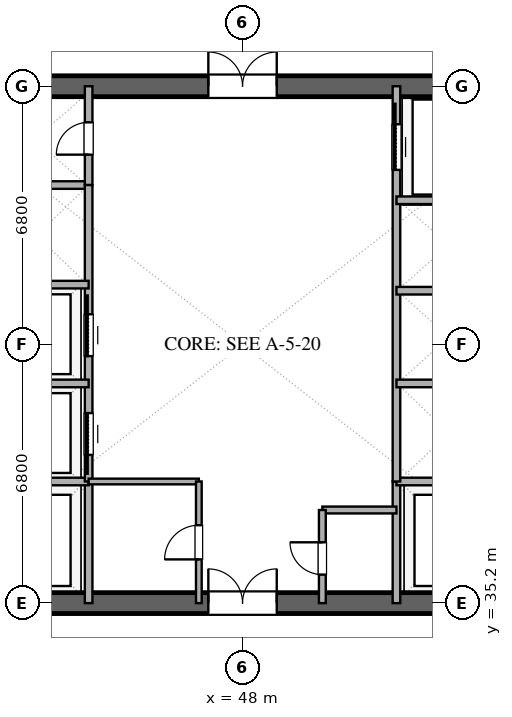
"""IFC4 building model, lengths in metres.
Left out: names, types, materials, properties, quantities, classifications, styles, units other than length and angle.
Written with IfcOpenShell. Run it as: python <this file> out.ifc"""

import sys

from ifc_helpers import new_model, si_unit, direction, frame, frame_2d, origin, place, context, subcontext, project, spatial, rectangle, extrude, element, fill, save


model = new_model("IFC4")
c1 = context("Model", 3, precision=1e-05, world=origin(), true_north=direction((0.0, 1.0)))
c2 = subcontext(c1, "Body", "Model", "MODEL_VIEW")
j1 = project(units=[si_unit("LENGTHUNIT", "METRE"), si_unit("PLANEANGLEUNIT", "RADIAN")], contexts=[c1])
p1 = place(None, origin())
s1 = spatial("IfcSite", under=j1, at=p1, CompositionType="ELEMENT")
p2 = place(p1, origin())
s2 = spatial("IfcBuilding", under=s1, at=p2, CompositionType="ELEMENT")
p3 = place(p2, frame((0.0, 0.0, 120.0)))
s3 = spatial("IfcBuildingStorey", under=s2, at=p3, CompositionType="ELEMENT", Elevation=120.0)
p4 = place(p3, frame((41.0, 35.2, 0.0), z_axis=(0.0, 0.0, 1.0), x_axis=(1.0, 0.0, 0.0)))
e1 = element("IfcWall", 1, at=p4, inside=s3, PredefinedType="SHEAR", context=c2, shape_type="SweptSolid", body=[
    extrude(rectangle(XDim=14.0, YDim=0.55, at=frame_2d((7.0, 0.0))), origin(), (0.0, 0.0, 1.0), 3.38),
])
p5 = place(p4, frame((6.1, 0.0, 0.0)))
e2 = element("IfcOpeningElement", 2, at=p5, cuts=e1, PredefinedType="OPENING", context=c2, shape_type="SweptSolid", body=[
    extrude(rectangle(XDim=1.8, YDim=2.25, at=frame_2d((0.9, 1.125))), frame((0.0, 0.285, 0.0), z_axis=(0.0, -1.0, 0.0), x_axis=(1.0, 0.0, 0.0)), (0.0, 0.0, 1.0), 0.57),
])
p6 = place(p3, frame((41.0, 48.8, 0.0), z_axis=(0.0, 0.0, 1.0), x_axis=(1.0, 0.0, 0.0)))
e3 = element("IfcWall", 3, at=p6, inside=s3, PredefinedType="SHEAR", context=c2, shape_type="SweptSolid", body=[
    extrude(rectangle(XDim=14.0, YDim=0.55, at=frame_2d((7.0, 0.0))), origin(), (0.0, 0.0, 1.0), 3.38),
])
p7 = place(p6, frame((6.1, 0.0, 0.0)))
e4 = element("IfcOpeningElement", 4, at=p7, cuts=e3, PredefinedType="OPENING", context=c2, shape_type="SweptSolid", body=[
    extrude(rectangle(XDim=1.8, YDim=2.25, at=frame_2d((0.9, 1.125))), frame((0.0, 0.285, 0.0), z_axis=(0.0, -1.0, 0.0), x_axis=(1.0, 0.0, 0.0)), (0.0, 0.0, 1.0), 0.57),
])
p8 = place(p3, frame((43.95, 35.2, 0.0), z_axis=(0.0, 0.0, 1.0), x_axis=(0.0, 1.0, 0.0)))
e5 = element("IfcWall", 5, at=p8, inside=s3, PredefinedType="SOLIDWALL", context=c2, shape_type="SweptSolid", body=[
    extrude(rectangle(XDim=3.2, YDim=0.2, at=frame_2d((1.6, 0.0))), origin(), (0.0, 0.0, 1.0), 2.74),
])
p9 = place(p3, frame((41.0, 38.4, 0.0), z_axis=(0.0, 0.0, 1.0), x_axis=(1.0, 0.0, 0.0)))
e6 = element("IfcWall", 6, at=p9, inside=s3, PredefinedType="SOLIDWALL", context=c2, shape_type="SweptSolid", body=[
    extrude(rectangle(XDim=2.95, YDim=0.2, at=frame_2d((1.475, 0.0))), origin(), (0.0, 0.0, 1.0), 2.74),
])
p10 = place(p3, frame((52.05, 35.2, 0.0), z_axis=(0.0, 0.0, 1.0), x_axis=(0.0, 1.0, 0.0)))
e7 = element("IfcWall", 7, at=p10, inside=s3, PredefinedType="SOLIDWALL", context=c2, shape_type="SweptSolid", body=[
    extrude(rectangle(XDim=3.2, YDim=0.2, at=frame_2d((1.6, 0.0))), origin(), (0.0, 0.0, 1.0), 2.74),
])
for number, where, z_axis, x_axis in (
    (8, (52.05, 38.4, 0.0), (0.0, 0.0, 1.0), (1.0, 0.0, 0.0)),
    (9, (41.0, 46.2, 0.0), (0.0, 0.0, 1.0), (1.0, 0.0, 0.0)),
):
    element("IfcWall", number, at=place(p3, frame(where, z_axis=z_axis, x_axis=x_axis)), inside=s3, PredefinedType="SOLIDWALL", context=c2, shape_type="SweptSolid", body=[
        extrude(rectangle(XDim=2.95, YDim=0.2, at=frame_2d((1.475, 0.0))), origin(), (0.0, 0.0, 1.0), 2.74),
    ])
p11 = place(p3, frame((43.95, 46.2, 0.0), z_axis=(0.0, 0.0, 1.0), x_axis=(0.0, 1.0, 0.0)))
e10 = element("IfcWall", 10, at=p11, inside=s3, PredefinedType="SOLIDWALL", context=c2, shape_type="SweptSolid", body=[
    extrude(rectangle(XDim=2.6, YDim=0.2, at=frame_2d((1.3, 0.0))), origin(), (0.0, 0.0, 1.0), 2.74),
])
p12 = place(p11, frame((0.8, 0.0, 0.0)))
e11 = element("IfcOpeningElement", 11, at=p12, cuts=e10, PredefinedType="OPENING", context=c2, shape_type="SweptSolid", body=[
    extrude(rectangle(XDim=0.85, YDim=2.15, at=frame_2d((0.425, 1.075))), frame((0.0, 0.11, 0.0), z_axis=(0.0, -1.0, 0.0), x_axis=(1.0, 0.0, 0.0)), (0.0, 0.0, 1.0), 0.22),
])
p13 = place(p3, frame((43.95, 38.4, 0.0), z_axis=(0.0, 0.0, 1.0), x_axis=(0.0, 1.0, 0.0)))
e12 = element("IfcWall", 12, at=p13, inside=s3, PredefinedType="SOLIDWALL", context=c2, shape_type="SweptSolid", body=[
    extrude(rectangle(XDim=7.8, YDim=0.2, at=frame_2d((3.9, 0.0))), origin(), (0.0, 0.0, 1.0), 2.74),
])
p14 = place(p13, frame((0.7, 0.0, 0.0)))
e13 = element("IfcOpeningElement", 13, at=p14, cuts=e12, PredefinedType="OPENING", context=c2, shape_type="SweptSolid", body=[
    extrude(rectangle(XDim=1.1, YDim=2.2, at=frame_2d((0.55, 1.1))), frame((0.0, 0.11, 0.0), z_axis=(0.0, -1.0, 0.0), x_axis=(1.0, 0.0, 0.0)), (0.0, 0.0, 1.0), 0.22),
])
p15 = place(p13, frame((3.3, 0.0, 0.0)))
e14 = element("IfcOpeningElement", 14, at=p15, cuts=e12, PredefinedType="OPENING", context=c2, shape_type="SweptSolid", body=[
    extrude(rectangle(XDim=1.1, YDim=2.2, at=frame_2d((0.55, 1.1))), frame((0.0, 0.11, 0.0), z_axis=(0.0, -1.0, 0.0), x_axis=(1.0, 0.0, 0.0)), (0.0, 0.0, 1.0), 0.22),
])
for number, where, z_axis, x_axis in (
    (15, (41.0, 40.98, 0.0), (0.0, 0.0, 1.0), (1.0, 0.0, 0.0)),
    (16, (41.0, 43.58, 0.0), (0.0, 0.0, 1.0), (1.0, 0.0, 0.0)),
):
    element("IfcWall", number, at=place(p3, frame(where, z_axis=z_axis, x_axis=x_axis)), inside=s3, PredefinedType="SOLIDWALL", context=c2, shape_type="SweptSolid", body=[
        extrude(rectangle(XDim=2.95, YDim=0.2, at=frame_2d((1.475, 0.0))), origin(), (0.0, 0.0, 1.0), 2.74),
    ])
p16 = place(p3, frame((52.05, 38.4, 0.0), z_axis=(0.0, 0.0, 1.0), x_axis=(0.0, 1.0, 0.0)))
e17 = element("IfcWall", 17, at=p16, inside=s3, PredefinedType="SOLIDWALL", context=c2, shape_type="SweptSolid", body=[
    extrude(rectangle(XDim=10.4, YDim=0.2, at=frame_2d((5.2, 0.0))), origin(), (0.0, 0.0, 1.0), 2.74),
])
p17 = place(p16, frame((8.2, 0.0, 0.0)))
e18 = element("IfcOpeningElement", 18, at=p17, cuts=e17, PredefinedType="OPENING", context=c2, shape_type="SweptSolid", body=[
    extrude(rectangle(XDim=1.2, YDim=2.2, at=frame_2d((0.6, 1.1))), frame((0.0, 0.11, 0.0), z_axis=(0.0, -1.0, 0.0), x_axis=(1.0, 0.0, 0.0)), (0.0, 0.0, 1.0), 0.22),
])
for number, where, z_axis, x_axis in (
    (19, (52.05, 40.98, 0.0), (0.0, 0.0, 1.0), (1.0, 0.0, 0.0)),
    (20, (52.05, 43.42, 0.0), (0.0, 0.0, 1.0), (1.0, 0.0, 0.0)),
    (21, (52.05, 45.8, 0.0), (0.0, 0.0, 1.0), (1.0, 0.0, 0.0)),
):
    element("IfcWall", number, at=place(p3, frame(where, z_axis=z_axis, x_axis=x_axis)), inside=s3, PredefinedType="SOLIDWALL", context=c2, shape_type="SweptSolid", body=[
        extrude(rectangle(XDim=2.95, YDim=0.2, at=frame_2d((1.475, 0.0))), origin(), (0.0, 0.0, 1.0), 2.74),
    ])
p18 = place(p3, frame((43.95, 38.4, 0.0), z_axis=(0.0, 0.0, 1.0), x_axis=(1.0, 0.0, 0.0)))
e22 = element("IfcWall", 22, at=p18, inside=s3, PredefinedType="PARTITIONING", context=c2, shape_type="SweptSolid", body=[
    extrude(rectangle(XDim=2.9, YDim=0.15, at=frame_2d((1.45, 0.0))), origin(), (0.0, 0.0, 1.0), 2.74),
])
p19 = place(p3, frame((46.85, 35.2, 0.0), z_axis=(0.0, 0.0, 1.0), x_axis=(0.0, 1.0, 0.0)))
e23 = element("IfcWall", 23, at=p19, inside=s3, PredefinedType="PARTITIONING", context=c2, shape_type="SweptSolid", body=[
    extrude(rectangle(XDim=3.2, YDim=0.15, at=frame_2d((1.6, 0.0))), origin(), (0.0, 0.0, 1.0), 2.74),
])
p20 = place(p19, frame((1.15, 0.0, 0.0)))
e24 = element("IfcOpeningElement", 24, at=p20, cuts=e23, PredefinedType="OPENING", context=c2, shape_type="SweptSolid", body=[
    extrude(rectangle(XDim=0.9, YDim=2.15, at=frame_2d((0.45, 1.075))), frame((0.0, 0.085, 0.0), z_axis=(0.0, -1.0, 0.0), x_axis=(1.0, 0.0, 0.0)), (0.0, 0.0, 1.0), 0.17),
])
p21 = place(p3, frame((50.1, 37.65, 0.0), z_axis=(0.0, 0.0, 1.0), x_axis=(1.0, 0.0, 0.0)))
e25 = element("IfcWall", 25, at=p21, inside=s3, PredefinedType="PLUMBINGWALL", context=c2, shape_type="SweptSolid", body=[
    extrude(rectangle(XDim=1.95, YDim=0.18, at=frame_2d((0.975, 0.0))), origin(), (0.0, 0.0, 1.0), 2.74),
])
p22 = place(p3, frame((50.1, 35.2, 0.0), z_axis=(0.0, 0.0, 1.0), x_axis=(0.0, 1.0, 0.0)))
e26 = element("IfcWall", 26, at=p22, inside=s3, PredefinedType="PLUMBINGWALL", context=c2, shape_type="SweptSolid", body=[
    extrude(rectangle(XDim=2.45, YDim=0.18, at=frame_2d((1.225, 0.0))), origin(), (0.0, 0.0, 1.0), 2.74),
])
p23 = place(p22, frame((0.75, 0.0, 0.0)))
e27 = element("IfcOpeningElement", 27, at=p23, cuts=e26, PredefinedType="OPENING", context=c2, shape_type="SweptSolid", body=[
    extrude(rectangle(XDim=0.85, YDim=2.1, at=frame_2d((0.425, 1.05))), frame((0.0, 0.1, 0.0), z_axis=(0.0, -1.0, 0.0), x_axis=(1.0, 0.0, 0.0)), (0.0, 0.0, 1.0), 0.2),
])
p24 = place(p5, origin())
e28 = element("IfcDoor", 28, at=p24, inside=s3, OperationType="DOUBLE_DOOR_SINGLE_SWING", PredefinedType="DOOR", context=c2, shape_type="SweptSolid", body=[
    extrude(rectangle(XDim=1.8, YDim=2.25, at=frame_2d((0.9, 1.125))), frame((0.0, 0.025, 0.0), z_axis=(0.0, -1.0, 0.0), x_axis=(1.0, 0.0, 0.0)), (0.0, 0.0, 1.0), 0.05),
])
fill(e2, e28)
p25 = place(p7, origin())
e29 = element("IfcDoor", 29, at=p25, inside=s3, OperationType="DOUBLE_DOOR_SINGLE_SWING", PredefinedType="DOOR", context=c2, shape_type="SweptSolid", body=[
    extrude(rectangle(XDim=1.8, YDim=2.25, at=frame_2d((0.9, 1.125))), frame((0.0, 0.025, 0.0), z_axis=(0.0, -1.0, 0.0), x_axis=(1.0, 0.0, 0.0)), (0.0, 0.0, 1.0), 0.05),
])
fill(e4, e29)
p26 = place(p12, origin())
e30 = element("IfcDoor", 30, at=p26, inside=s3, OperationType="SINGLE_SWING_LEFT", PredefinedType="DOOR", context=c2, shape_type="SweptSolid", body=[
    extrude(rectangle(XDim=0.85, YDim=2.15, at=frame_2d((0.425, 1.075))), frame((0.0, 0.025, 0.0), z_axis=(0.0, -1.0, 0.0), x_axis=(1.0, 0.0, 0.0)), (0.0, 0.0, 1.0), 0.05),
])
fill(e11, e30)
p27 = place(p14, origin())
e31 = element("IfcDoor", 31, at=p27, inside=s3, OperationType="SLIDING_TO_LEFT", PredefinedType="DOOR", context=c2, shape_type="SweptSolid", body=[
    extrude(rectangle(XDim=1.1, YDim=2.2, at=frame_2d((0.55, 1.1))), frame((0.0, 0.025, 0.0), z_axis=(0.0, -1.0, 0.0), x_axis=(1.0, 0.0, 0.0)), (0.0, 0.0, 1.0), 0.05),
])
fill(e13, e31)
p28 = place(p15, origin())
e32 = element("IfcDoor", 32, at=p28, inside=s3, OperationType="SLIDING_TO_RIGHT", PredefinedType="DOOR", context=c2, shape_type="SweptSolid", body=[
    extrude(rectangle(XDim=1.1, YDim=2.2, at=frame_2d((0.55, 1.1))), frame((0.0, 0.025, 0.0), z_axis=(0.0, -1.0, 0.0), x_axis=(1.0, 0.0, 0.0)), (0.0, 0.0, 1.0), 0.05),
])
fill(e14, e32)
p29 = place(p17, origin())
e33 = element("IfcDoor", 33, at=p29, inside=s3, OperationType="SLIDING_TO_RIGHT", PredefinedType="DOOR", context=c2, shape_type="SweptSolid", body=[
    extrude(rectangle(XDim=1.2, YDim=2.2, at=frame_2d((0.6, 1.1))), frame((0.0, 0.025, 0.0), z_axis=(0.0, -1.0, 0.0), x_axis=(1.0, 0.0, 0.0)), (0.0, 0.0, 1.0), 0.05),
])
fill(e18, e33)
p30 = place(p20, origin())
e34 = element("IfcDoor", 34, at=p30, inside=s3, OperationType="SINGLE_SWING_LEFT", PredefinedType="DOOR", context=c2, shape_type="SweptSolid", body=[
    extrude(rectangle(XDim=0.9, YDim=2.15, at=frame_2d((0.45, 1.075))), frame((0.0, 0.025, 0.0), z_axis=(0.0, -1.0, 0.0), x_axis=(1.0, 0.0, 0.0)), (0.0, 0.0, 1.0), 0.05),
])
fill(e24, e34)
p31 = place(p23, origin())
e35 = element("IfcDoor", 35, at=p31, inside=s3, OperationType="SINGLE_SWING_RIGHT", PredefinedType="DOOR", context=c2, shape_type="SweptSolid", body=[
    extrude(rectangle(XDim=0.85, YDim=2.1, at=frame_2d((0.425, 1.05))), frame((0.0, 0.025, 0.0), z_axis=(0.0, -1.0, 0.0), x_axis=(1.0, 0.0, 0.0)), (0.0, 0.0, 1.0), 0.05),
])
fill(e27, e35)
save(model, sys.argv[1])
